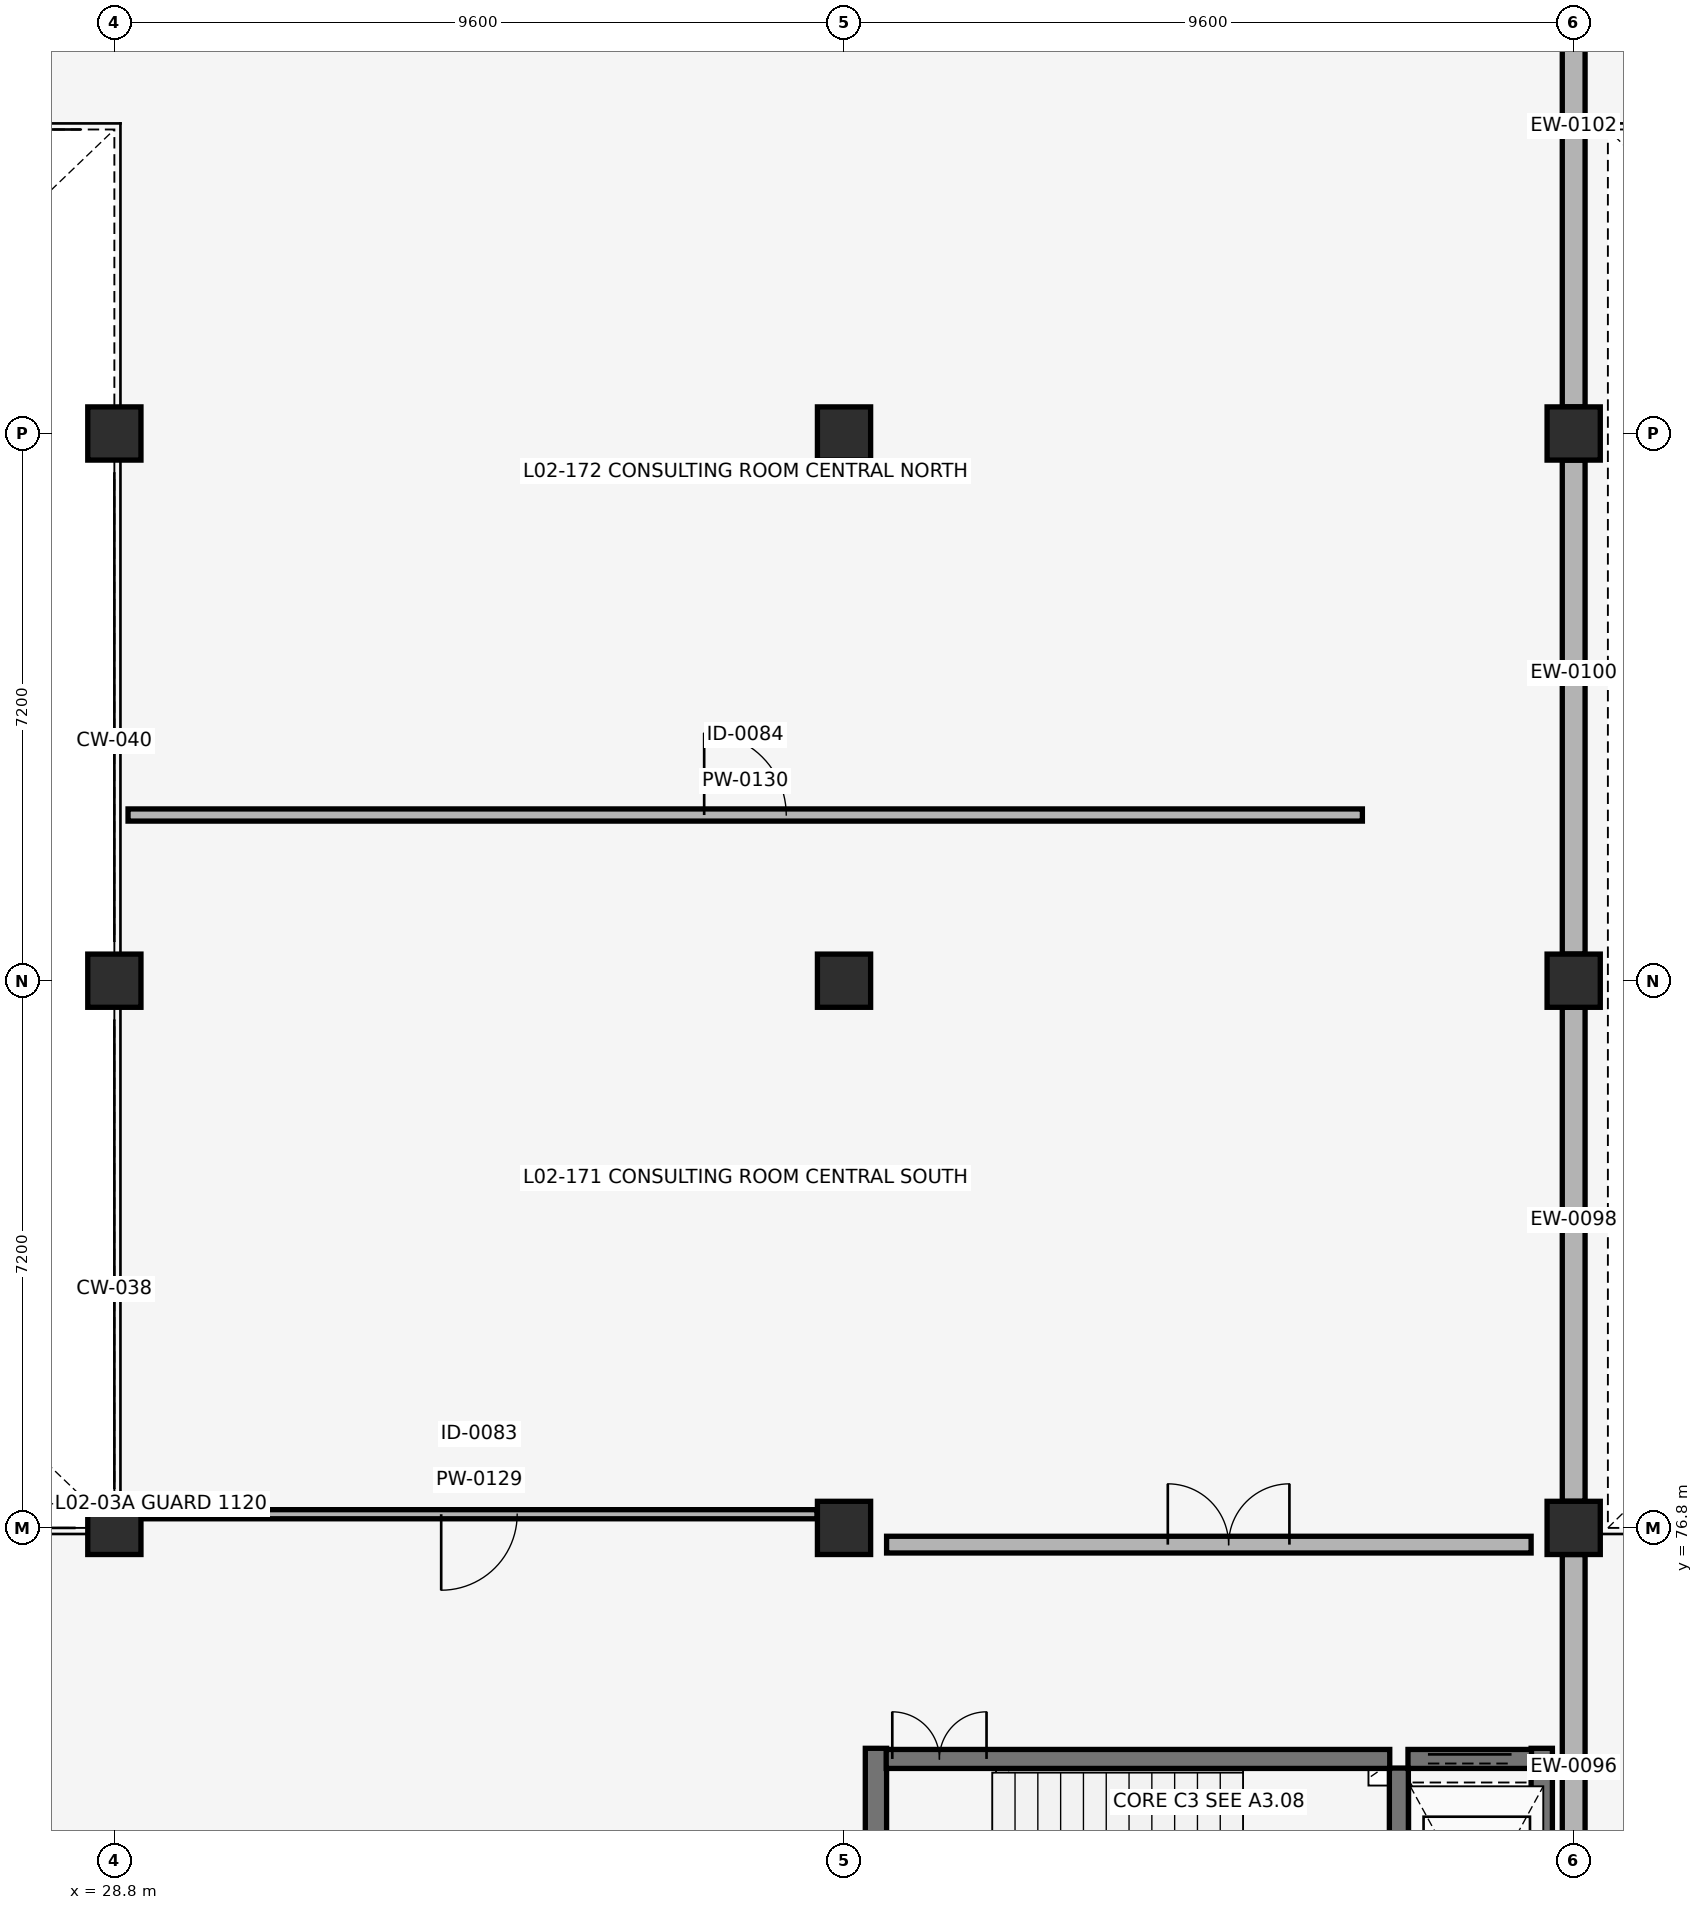
"""IFC4 building model, lengths in metres.
Left out: names, types, materials, properties, quantities, classifications, styles, units other than length and angle.
Written with IfcOpenShell. Run it as: python <this file> out.ifc"""

import sys

from ifc_helpers import new_model, si_unit, direction, frame, frame_2d, origin, origin_2d, place, context, subcontext, project, spatial, rectangle, extrude, element, fill, save


model = new_model("IFC4")
c1 = context("Model", 3, precision=1e-05, world=origin(), true_north=direction((0.0, 1.0)))
c2 = subcontext(c1, "Body", "Model", "MODEL_VIEW")
j1 = project(units=[si_unit("LENGTHUNIT", "METRE"), si_unit("PLANEANGLEUNIT", "RADIAN")], contexts=[c1])
p1 = place(None, origin())
s1 = spatial("IfcSite", under=j1, at=p1, CompositionType="ELEMENT")
p2 = place(p1, origin())
s2 = spatial("IfcBuilding", under=s1, at=p2, CompositionType="ELEMENT")
p3 = place(p2, frame((0.0, 0.0, 8.5)))
s3 = spatial("IfcBuildingStorey", under=s2, at=p3, CompositionType="ELEMENT", Elevation=8.5)
for number, where, z_axis, x_axis in (
    (1, (28.8, 76.8, 0.0), (0.0, 0.0, 1.0), (1.0, 0.0, 0.0)),
    (2, (28.8, 84.0, 0.0), (0.0, 0.0, 1.0), (1.0, 0.0, 0.0)),
    (3, (28.8, 91.2, 0.0), (0.0, 0.0, 1.0), (1.0, 0.0, 0.0)),
    (4, (38.4, 76.8, 0.0), (0.0, 0.0, 1.0), (1.0, 0.0, 0.0)),
    (5, (38.4, 84.0, 0.0), (0.0, 0.0, 1.0), (1.0, 0.0, 0.0)),
    (6, (38.4, 91.2, 0.0), (0.0, 0.0, 1.0), (1.0, 0.0, 0.0)),
    (7, (48.0, 76.8, 0.0), (0.0, 0.0, 1.0), (1.0, 0.0, 0.0)),
    (8, (48.0, 84.0, 0.0), (0.0, 0.0, 1.0), (1.0, 0.0, 0.0)),
    (9, (48.0, 91.2, 0.0), (0.0, 0.0, 1.0), (1.0, 0.0, 0.0)),
):
    element("IfcColumn", number, at=place(p3, frame(where, z_axis=z_axis, x_axis=x_axis)), inside=s3, PredefinedType="COLUMN", context=c2, shape_type="SweptSolid", body=[
        extrude(rectangle(XDim=0.7, YDim=0.7, at=origin_2d()), origin(), (0.0, 0.0, 1.0), 4.08),
    ])
for number, where, z_axis, x_axis in (
    (10, (48.0, 69.95, 0.0), (0.0, 0.0, 1.0), (0.0, 1.0, 0.0)),
    (11, (48.0, 77.15, 0.0), (0.0, 0.0, 1.0), (0.0, 1.0, 0.0)),
    (12, (48.0, 84.35, 0.0), (0.0, 0.0, 1.0), (0.0, 1.0, 0.0)),
    (13, (48.0, 91.55, 0.0), (0.0, 0.0, 1.0), (0.0, 1.0, 0.0)),
):
    element("IfcWall", number, at=place(p3, frame(where, z_axis=z_axis, x_axis=x_axis)), inside=s3, PredefinedType="SOLIDWALL", context=c2, shape_type="SweptSolid", body=[
        extrude(rectangle(XDim=6.5, YDim=0.3, at=frame_2d((3.25, 0.0))), origin(), (0.0, 0.0, 1.0), 3.08),
    ])
for number, where, z_axis, x_axis in (
    (14, (38.82, 69.82, 0.0), (0.0, 0.0, 1.0), (0.0, 1.0, 0.0)),
    (15, (47.58, 69.82, 0.0), (0.0, 0.0, 1.0), (0.0, 1.0, 0.0)),
):
    element("IfcWall", number, at=place(p3, frame(where, z_axis=z_axis, x_axis=x_axis)), inside=s3, PredefinedType="SHEAR", context=c2, shape_type="SweptSolid", body=[
        extrude(rectangle(XDim=4.08, YDim=0.28, at=frame_2d((2.04, 0.0))), origin(), (0.0, 0.0, 1.0), 3.8),
    ])
p4 = place(p3, frame((45.7, 70.1, 0.0), z_axis=(0.0, 0.0, 1.0), x_axis=(0.0, 1.0, 0.0)))
e16 = element("IfcWall", 16, at=p4, inside=s3, PredefinedType="SHEAR", context=c2, shape_type="SweptSolid", body=[
    extrude(rectangle(XDim=3.54, YDim=0.25, at=frame_2d((1.77, 0.0))), origin(), (0.0, 0.0, 1.0), 3.8),
])
p5 = place(p3, frame((38.955, 73.76, 0.0), z_axis=(0.0, 0.0, 1.0), x_axis=(1.0, 0.0, 0.0)))
e17 = element("IfcWall", 17, at=p5, inside=s3, PredefinedType="SHEAR", context=c2, shape_type="SweptSolid", body=[
    extrude(rectangle(XDim=6.625, YDim=0.25, at=frame_2d((3.312, 0.0))), origin(), (0.0, 0.0, 1.0), 3.8),
])
p6 = place(p5, frame((0.08, 0.0, 0.0)))
e18 = element("IfcOpeningElement", 18, at=p6, cuts=e17, PredefinedType="OPENING", context=c2, shape_type="SweptSolid", body=[
    extrude(rectangle(XDim=1.24, YDim=2.15, at=frame_2d((0.62, 1.075))), frame((0.0, 0.135, 0.0), z_axis=(0.0, -1.0, 0.0), x_axis=(1.0, 0.0, 0.0)), (0.0, 0.0, 1.0), 0.27),
])
p7 = place(p3, frame((38.96, 76.58, 0.0), z_axis=(0.0, 0.0, 1.0), x_axis=(1.0, 0.0, 0.0)))
e19 = element("IfcWall", 19, at=p7, inside=s3, PredefinedType="PARTITIONING", context=c2, shape_type="SweptSolid", body=[
    extrude(rectangle(XDim=8.48, YDim=0.22, at=frame_2d((4.24, 0.0))), origin(), (0.0, 0.0, 1.0), 3.13),
])
p8 = place(p7, frame((3.7, 0.0, 0.0)))
e20 = element("IfcOpeningElement", 20, at=p8, cuts=e19, PredefinedType="OPENING", context=c2, shape_type="SweptSolid", body=[
    extrude(rectangle(XDim=1.6, YDim=2.2, at=frame_2d((0.8, 1.1))), frame((0.0, 0.12, 0.0), z_axis=(0.0, -1.0, 0.0), x_axis=(1.0, 0.0, 0.0)), (0.0, 0.0, 1.0), 0.24),
])
p9 = place(p3, frame((45.82, 73.76, 0.0), z_axis=(0.0, 0.0, 1.0), x_axis=(1.0, 0.0, 0.0)))
e21 = element("IfcWall", 21, at=p9, inside=s3, PredefinedType="SHEAR", context=c2, shape_type="SweptSolid", body=[
    extrude(rectangle(XDim=1.625, YDim=0.25, at=frame_2d((0.812, 0.0))), origin(), (0.0, 0.0, 1.0), 3.8),
])
p10 = place(p9, frame((0.262, 0.0, 0.0)))
e22 = element("IfcOpeningElement", 22, at=p10, cuts=e21, PredefinedType="OPENING", context=c2, shape_type="SweptSolid", body=[
    extrude(rectangle(XDim=1.1, YDim=2.15, at=frame_2d((0.55, 1.075))), frame((0.0, 0.135, 0.0), z_axis=(0.0, -1.0, 0.0), x_axis=(1.0, 0.0, 0.0)), (0.0, 0.0, 1.0), 0.27),
])
p11 = place(p3, frame((29.155, 76.98, 0.0), z_axis=(0.0, 0.0, 1.0), x_axis=(1.0, 0.0, 0.0)))
e23 = element("IfcWall", 23, at=p11, inside=s3, PredefinedType="PARTITIONING", context=c2, shape_type="SweptSolid", body=[
    extrude(rectangle(XDim=8.89, YDim=0.12, at=frame_2d((4.445, 0.0))), origin(), (0.0, 0.0, 1.0), 3.12),
])
p12 = place(p11, frame((3.945, 0.0, 0.0)))
e24 = element("IfcOpeningElement", 24, at=p12, cuts=e23, PredefinedType="OPENING", context=c2, shape_type="SweptSolid", body=[
    extrude(rectangle(XDim=1.0, YDim=2.1, at=frame_2d((0.5, 1.05))), frame((0.0, 0.07, 0.0), z_axis=(0.0, -1.0, 0.0), x_axis=(1.0, 0.0, 0.0)), (0.0, 0.0, 1.0), 0.14),
])
p13 = place(p3, frame((28.98, 86.18, 0.0), z_axis=(0.0, 0.0, 1.0), x_axis=(1.0, 0.0, 0.0)))
e25 = element("IfcWall", 25, at=p13, inside=s3, PredefinedType="PARTITIONING", context=c2, shape_type="SweptSolid", body=[
    extrude(rectangle(XDim=16.24, YDim=0.16, at=frame_2d((8.12, 0.0))), origin(), (0.0, 0.0, 1.0), 3.12),
])
p14 = place(p13, frame((7.58, 0.0, 0.0)))
e26 = element("IfcOpeningElement", 26, at=p14, cuts=e25, PredefinedType="OPENING", context=c2, shape_type="SweptSolid", body=[
    extrude(rectangle(XDim=1.08, YDim=2.1, at=frame_2d((0.54, 1.05))), frame((0.0, 0.09, 0.0), z_axis=(0.0, -1.0, 0.0), x_axis=(1.0, 0.0, 0.0)), (0.0, 0.0, 1.0), 0.18),
])
p15 = place(p6, origin())
e27 = element("IfcDoor", 27, at=p15, inside=s3, OperationType="DOUBLE_DOOR_SINGLE_SWING", PredefinedType="DOOR", context=c2, shape_type="SweptSolid", body=[
    extrude(rectangle(XDim=1.24, YDim=2.15, at=frame_2d((0.62, 1.075))), frame((0.0, 0.025, 0.0), z_axis=(0.0, -1.0, 0.0), x_axis=(1.0, 0.0, 0.0)), (0.0, 0.0, 1.0), 0.05),
])
fill(e18, e27)
p16 = place(p8, origin())
e28 = element("IfcDoor", 28, at=p16, inside=s3, OperationType="DOUBLE_DOOR_SINGLE_SWING", PredefinedType="DOOR", context=c2, shape_type="SweptSolid", body=[
    extrude(rectangle(XDim=1.6, YDim=2.2, at=frame_2d((0.8, 1.1))), frame((0.0, 0.025, 0.0), z_axis=(0.0, -1.0, 0.0), x_axis=(1.0, 0.0, 0.0)), (0.0, 0.0, 1.0), 0.05),
])
fill(e20, e28)
p17 = place(p10, origin())
e29 = element("IfcDoor", 29, at=p17, inside=s3, OperationType="DOUBLE_DOOR_SLIDING", PredefinedType="DOOR", context=c2, shape_type="SweptSolid", body=[
    extrude(rectangle(XDim=1.1, YDim=2.15, at=frame_2d((0.55, 1.075))), frame((0.0, 0.025, 0.0), z_axis=(0.0, -1.0, 0.0), x_axis=(1.0, 0.0, 0.0)), (0.0, 0.0, 1.0), 0.05),
])
fill(e22, e29)
p18 = place(p12, origin())
e30 = element("IfcDoor", 30, at=p18, inside=s3, OperationType="SINGLE_SWING_RIGHT", PredefinedType="DOOR", context=c2, shape_type="SweptSolid", body=[
    extrude(rectangle(XDim=1.0, YDim=2.1, at=frame_2d((0.5, 1.05))), frame((0.0, 0.025, 0.0), z_axis=(0.0, -1.0, 0.0), x_axis=(1.0, 0.0, 0.0)), (0.0, 0.0, 1.0), 0.05),
])
fill(e24, e30)
p19 = place(p14, origin())
e31 = element("IfcDoor", 31, at=p19, inside=s3, OperationType="SINGLE_SWING_LEFT", PredefinedType="DOOR", context=c2, shape_type="SweptSolid", body=[
    extrude(rectangle(XDim=1.08, YDim=2.1, at=frame_2d((0.54, 1.05))), frame((0.0, 0.025, 0.0), z_axis=(0.0, -1.0, 0.0), x_axis=(1.0, 0.0, 0.0)), (0.0, 0.0, 1.0), 0.05),
])
fill(e26, e31)
save(model, sys.argv[1])
